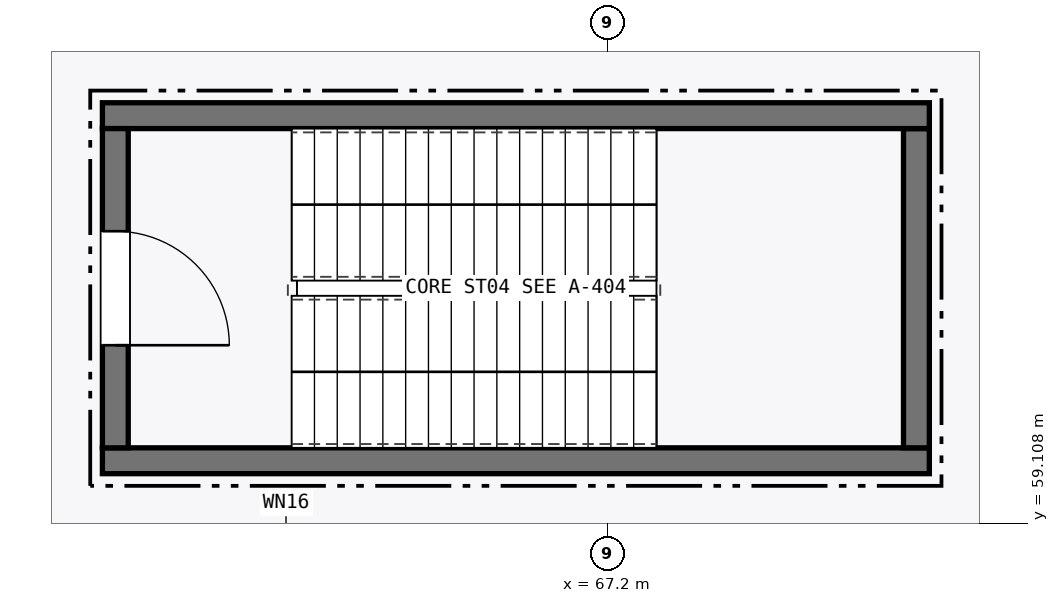
"""IFC4 building model, lengths in metres.
Left out: names, types, materials, properties, quantities, classifications, styles, units other than length and angle.
Written with IfcOpenShell. Run it as: python <this file> out.ifc"""

import sys

from ifc_helpers import new_model, si_unit, direction, frame, frame_2d, origin, place, context, subcontext, project, spatial, rectangle, extrude, element, fill, save


model = new_model("IFC4")
c1 = context("Model", 3, precision=1e-05, world=origin(), true_north=direction((0.0, 1.0)))
c2 = subcontext(c1, "Body", "Model", "MODEL_VIEW")
j1 = project(units=[si_unit("LENGTHUNIT", "METRE"), si_unit("PLANEANGLEUNIT", "RADIAN")], contexts=[c1])
p1 = place(None, origin())
s1 = spatial("IfcSite", under=j1, at=p1, CompositionType="ELEMENT")
p2 = place(p1, origin())
s2 = spatial("IfcBuilding", under=s1, at=p2, CompositionType="ELEMENT")
p3 = place(p2, frame((0.0, 0.0, 11.4)))
s3 = spatial("IfcBuildingStorey", under=s2, at=p3, CompositionType="ELEMENT", Elevation=11.4)
p4 = place(p3, frame((60.56, 59.93, 0.0), z_axis=(0.0, 0.0, 1.0), x_axis=(1.0, 0.0, 0.0)))
e1 = element("IfcWall", 1, at=p4, inside=s3, PredefinedType="SHEAR", context=c2, shape_type="SweptSolid", body=[
    extrude(rectangle(XDim=10.88, YDim=0.34, at=frame_2d((5.44, 0.0))), origin(), (0.0, 0.0, 1.0), 4.845),
])
p5 = place(p3, frame((71.27, 60.1, 0.0), z_axis=(0.0, 0.0, 1.0), x_axis=(0.0, 1.0, 0.0)))
e2 = element("IfcWall", 2, at=p5, inside=s3, PredefinedType="SHEAR", context=c2, shape_type="SweptSolid", body=[
    extrude(rectangle(XDim=4.2, YDim=0.34, at=frame_2d((2.1, 0.0))), origin(), (0.0, 0.0, 1.0), 4.845),
])
p6 = place(p3, frame((71.44, 64.47, 0.0), z_axis=(0.0, 0.0, 1.0), x_axis=(-1.0, 0.0, 0.0)))
e3 = element("IfcWall", 3, at=p6, inside=s3, PredefinedType="SHEAR", context=c2, shape_type="SweptSolid", body=[
    extrude(rectangle(XDim=10.88, YDim=0.34, at=frame_2d((5.44, 0.0))), origin(), (0.0, 0.0, 1.0), 4.845),
])
p7 = place(p3, frame((60.73, 64.3, 0.0), z_axis=(0.0, 0.0, 1.0), x_axis=(0.0, -1.0, 0.0)))
e4 = element("IfcWall", 4, at=p7, inside=s3, PredefinedType="SHEAR", context=c2, shape_type="SweptSolid", body=[
    extrude(rectangle(XDim=4.2, YDim=0.34, at=frame_2d((2.1, 0.0))), origin(), (0.0, 0.0, 1.0), 4.845),
])
p8 = place(p7, frame((1.35, 0.0, 0.0)))
e5 = element("IfcOpeningElement", 5, at=p8, cuts=e4, PredefinedType="OPENING", context=c2, shape_type="SweptSolid", body=[
    extrude(rectangle(XDim=1.5, YDim=2.15, at=frame_2d((0.75, 1.075))), frame((0.0, 0.18, 0.0), z_axis=(0.0, -1.0, 0.0), x_axis=(1.0, 0.0, 0.0)), (0.0, 0.0, 1.0), 0.36),
])
p9 = place(p8, origin())
e6 = element("IfcDoor", 6, at=p9, inside=s3, OperationType="SINGLE_SWING_RIGHT", PredefinedType="DOOR", context=c2, shape_type="SweptSolid", body=[
    extrude(rectangle(XDim=1.5, YDim=2.15, at=frame_2d((0.75, 1.075))), frame((0.0, 0.025, 0.0), z_axis=(0.0, -1.0, 0.0), x_axis=(1.0, 0.0, 0.0)), (0.0, 0.0, 1.0), 0.05),
])
fill(e5, e6)
save(model, sys.argv[1])
